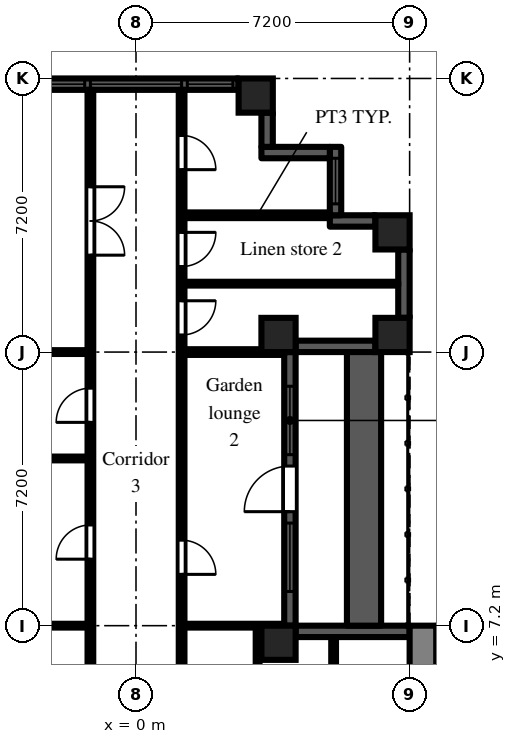
"""IFC4 building model, lengths in metres.
Left out: names, types, materials, properties, quantities, classifications, styles, units other than length and angle.
Written with IfcOpenShell. Run it as: python <this file> out.ifc"""

import sys

from ifc_helpers import new_model, si_unit, direction, frame, frame_2d, origin, origin_2d, place, context, subcontext, project, spatial, rectangle, extrude, element, fill, save


model = new_model("IFC4")
c1 = context("Model", 3, precision=1e-05, world=origin(), true_north=direction((0.0, 1.0)))
c2 = subcontext(c1, "Body", "Model", "MODEL_VIEW")
j1 = project(units=[si_unit("LENGTHUNIT", "METRE"), si_unit("PLANEANGLEUNIT", "RADIAN")], contexts=[c1])
p1 = place(None, origin())
s1 = spatial("IfcSite", under=j1, at=p1, CompositionType="ELEMENT")
p2 = place(p1, origin())
s2 = spatial("IfcBuilding", under=s1, at=p2, CompositionType="ELEMENT")
p3 = place(p2, frame((0.0, 0.0, 93.9)))
s3 = spatial("IfcBuildingStorey", under=s2, at=p3, CompositionType="ELEMENT", Elevation=93.9)
for number, where, z_axis, x_axis in (
    (1, (3.15, 21.15, 0.0), (0.0, 0.0, 1.0), (1.0, 0.0, 0.0)),
    (2, (3.75, 6.75, 0.0), (0.0, 0.0, 1.0), (1.0, 0.0, 0.0)),
    (3, (3.75, 14.85, 0.0), (0.0, 0.0, 1.0), (1.0, 0.0, 0.0)),
    (4, (6.75, 14.85, 0.0), (0.0, 0.0, 1.0), (1.0, 0.0, 0.0)),
    (5, (6.75, 17.55, 0.0), (0.0, 0.0, 1.0), (1.0, 0.0, 0.0)),
):
    element("IfcColumn", number, at=place(p3, frame(where, z_axis=z_axis, x_axis=x_axis)), inside=s3, PredefinedType="COLUMN", context=c2, shape_type="SweptSolid", body=[
        extrude(rectangle(XDim=0.9, YDim=0.9, at=origin_2d()), origin(), (0.0, 0.0, 1.0), 3.0),
    ])
p4 = place(p3, frame((7.2, 7.05, 0.0), z_axis=(0.0, 0.0, 1.0), x_axis=(-1.0, 0.0, 0.0)))
e6 = element("IfcWall", 6, at=p4, inside=s3, PredefinedType="SOLIDWALL", context=c2, shape_type="SweptSolid", body=[
    extrude(rectangle(XDim=3.0, YDim=0.3, at=frame_2d((1.5, 0.0))), origin(), (0.0, 0.0, 1.0), 2.1),
])
p5 = place(p3, frame((4.05, 7.2, 0.0), z_axis=(0.0, 0.0, 1.0), x_axis=(0.0, 1.0, 0.0)))
e7 = element("IfcWall", 7, at=p5, inside=s3, PredefinedType="SOLIDWALL", context=c2, shape_type="SweptSolid", body=[
    extrude(rectangle(XDim=7.2, YDim=0.3, at=frame_2d((3.6, 0.0))), origin(), (0.0, 0.0, 1.0), 2.1),
])
p6 = place(p5, frame((3.0, 0.0, 0.0)))
e8 = element("IfcOpeningElement", 8, at=p6, cuts=e7, PredefinedType="OPENING", context=c2, shape_type="SweptSolid", body=[
    extrude(rectangle(XDim=1.2, YDim=2.05, at=frame_2d((0.6, 1.025))), frame((0.0, 0.16, 0.0), z_axis=(0.0, -1.0, 0.0), x_axis=(1.0, 0.0, 0.0)), (0.0, 0.0, 1.0), 0.32),
])
p7 = place(p5, frame((0.9, 0.0, 0.2)))
e9 = element("IfcOpeningElement", 9, at=p7, cuts=e7, PredefinedType="OPENING", context=c2, shape_type="SweptSolid", body=[
    extrude(rectangle(XDim=1.8, YDim=1.85, at=frame_2d((0.9, 0.925))), frame((0.0, 0.16, 0.0), z_axis=(0.0, -1.0, 0.0), x_axis=(1.0, 0.0, 0.0)), (0.0, 0.0, 1.0), 0.32),
])
p8 = place(p5, frame((4.5, 0.0, 0.2)))
e10 = element("IfcOpeningElement", 10, at=p8, cuts=e7, PredefinedType="OPENING", context=c2, shape_type="SweptSolid", body=[
    extrude(rectangle(XDim=1.8, YDim=1.85, at=frame_2d((0.9, 0.925))), frame((0.0, 0.16, 0.0), z_axis=(0.0, -1.0, 0.0), x_axis=(1.0, 0.0, 0.0)), (0.0, 0.0, 1.0), 0.32),
])
p9 = place(p3, frame((4.2, 14.55, 0.0), z_axis=(0.0, 0.0, 1.0), x_axis=(1.0, 0.0, 0.0)))
e11 = element("IfcWall", 11, at=p9, inside=s3, PredefinedType="SOLIDWALL", context=c2, shape_type="SweptSolid", body=[
    extrude(rectangle(XDim=2.1, YDim=0.3, at=frame_2d((1.05, 0.0))), origin(), (0.0, 0.0, 1.0), 2.1),
])
p10 = place(p3, frame((7.05, 15.3, 0.0), z_axis=(0.0, 0.0, 1.0), x_axis=(0.0, 1.0, 0.0)))
e12 = element("IfcWall", 12, at=p10, inside=s3, PredefinedType="SOLIDWALL", context=c2, shape_type="SweptSolid", body=[
    extrude(rectangle(XDim=1.8, YDim=0.3, at=frame_2d((0.9, 0.0))), origin(), (0.0, 0.0, 1.0), 2.1),
])
p11 = place(p3, frame((6.3, 17.85, 0.0), z_axis=(0.0, 0.0, 1.0), x_axis=(-1.0, 0.0, 0.0)))
e13 = element("IfcWall", 13, at=p11, inside=s3, PredefinedType="SOLIDWALL", context=c2, shape_type="SweptSolid", body=[
    extrude(rectangle(XDim=1.2, YDim=0.3, at=frame_2d((0.6, 0.0))), origin(), (0.0, 0.0, 1.0), 2.575),
])
p12 = place(p3, frame((5.25, 18.0, 0.0), z_axis=(0.0, 0.0, 1.0), x_axis=(0.0, 1.0, 0.0)))
e14 = element("IfcWall", 14, at=p12, inside=s3, PredefinedType="SOLIDWALL", context=c2, shape_type="SweptSolid", body=[
    extrude(rectangle(XDim=1.8, YDim=0.3, at=frame_2d((0.9, 0.0))), origin(), (0.0, 0.0, 1.0), 2.575),
])
p13 = place(p12, frame((0.3, 0.0, 0.2)))
e15 = element("IfcOpeningElement", 15, at=p13, cuts=e14, PredefinedType="OPENING", context=c2, shape_type="SweptSolid", body=[
    extrude(rectangle(XDim=1.2, YDim=1.85, at=frame_2d((0.6, 0.925))), frame((0.0, 0.16, 0.0), z_axis=(0.0, -1.0, 0.0), x_axis=(1.0, 0.0, 0.0)), (0.0, 0.0, 1.0), 0.32),
])
p14 = place(p3, frame((5.1, 19.65, 0.0), z_axis=(0.0, 0.0, 1.0), x_axis=(-1.0, 0.0, 0.0)))
e16 = element("IfcWall", 16, at=p14, inside=s3, PredefinedType="SOLIDWALL", context=c2, shape_type="SweptSolid", body=[
    extrude(rectangle(XDim=1.8, YDim=0.3, at=frame_2d((0.9, 0.0))), origin(), (0.0, 0.0, 1.0), 2.575),
])
p15 = place(p3, frame((3.45, 19.8, 0.0), z_axis=(0.0, 0.0, 1.0), x_axis=(0.0, 1.0, 0.0)))
e17 = element("IfcWall", 17, at=p15, inside=s3, PredefinedType="SOLIDWALL", context=c2, shape_type="SweptSolid", body=[
    extrude(rectangle(XDim=0.9, YDim=0.3, at=frame_2d((0.45, 0.0))), origin(), (0.0, 0.0, 1.0), 2.575),
])
p16 = place(p3, frame((2.7, 21.45, 0.0), z_axis=(0.0, 0.0, 1.0), x_axis=(-1.0, 0.0, 0.0)))
e18 = element("IfcWall", 18, at=p16, inside=s3, PredefinedType="SOLIDWALL", context=c2, shape_type="SweptSolid", body=[
    extrude(rectangle(XDim=5.4, YDim=0.3, at=frame_2d((2.7, 0.0))), origin(), (0.0, 0.0, 1.0), 2.1),
])
p17 = place(p16, frame((1.5, 0.0, 0.2)))
e19 = element("IfcOpeningElement", 19, at=p17, cuts=e18, PredefinedType="OPENING", context=c2, shape_type="SweptSolid", body=[
    extrude(rectangle(XDim=2.4, YDim=1.85, at=frame_2d((1.2, 0.925))), frame((0.0, 0.16, 0.0), z_axis=(0.0, -1.0, 0.0), x_axis=(1.0, 0.0, 0.0)), (0.0, 0.0, 1.0), 0.32),
])
p18 = place(p16, frame((0.15, 0.0, 0.2)))
e20 = element("IfcOpeningElement", 20, at=p18, cuts=e18, PredefinedType="OPENING", context=c2, shape_type="SweptSolid", body=[
    extrude(rectangle(XDim=1.2, YDim=1.85, at=frame_2d((0.6, 0.925))), frame((0.0, 0.16, 0.0), z_axis=(0.0, -1.0, 0.0), x_axis=(1.0, 0.0, 0.0)), (0.0, 0.0, 1.0), 0.32),
])
p19 = place(p16, frame((4.05, 0.0, 0.2)))
e21 = element("IfcOpeningElement", 21, at=p19, cuts=e18, PredefinedType="OPENING", context=c2, shape_type="SweptSolid", body=[
    extrude(rectangle(XDim=1.2, YDim=1.85, at=frame_2d((0.6, 0.925))), frame((0.0, 0.16, 0.0), z_axis=(0.0, -1.0, 0.0), x_axis=(1.0, 0.0, 0.0)), (0.0, 0.0, 1.0), 0.32),
])
p20 = place(p3, frame((6.0, 7.2, 0.0), z_axis=(0.0, 0.0, 1.0), x_axis=(0.0, 1.0, 0.0)))
e22 = element("IfcWall", 22, at=p20, inside=s3, PredefinedType="PARAPET", context=c2, shape_type="SweptSolid", body=[
    extrude(rectangle(XDim=7.2, YDim=0.9, at=frame_2d((3.6, 0.0))), origin(), (0.0, 0.0, 1.0), 0.8),
])
p21 = place(p3, frame((7.55, -7.2, 0.0), z_axis=(0.0, 0.0, 1.0), x_axis=(0.0, 1.0, 0.0)))
e23 = element("IfcWall", 23, at=p21, inside=s3, PredefinedType="SHEAR", context=c2, shape_type="SweptSolid", body=[
    extrude(rectangle(XDim=14.4, YDim=0.7, at=frame_2d((7.2, 0.0))), origin(), (0.0, 0.0, 1.0), 2.575),
])
p22 = place(p21, frame((6.0, 0.0, 0.0)))
e24 = element("IfcOpeningElement", 24, at=p22, cuts=e23, PredefinedType="OPENING", context=c2, shape_type="SweptSolid", body=[
    extrude(rectangle(XDim=2.4, YDim=2.2, at=frame_2d((1.2, 1.1))), frame((0.0, 0.36, 0.0), z_axis=(0.0, -1.0, 0.0), x_axis=(1.0, 0.0, 0.0)), (0.0, 0.0, 1.0), 0.72),
])
for number, where, z_axis, x_axis in (
    (25, (-3.9, 7.2, 0.0), (0.0, 0.0, 1.0), (1.0, 0.0, 0.0)),
    (26, (-3.9, 11.6, 0.0), (0.0, 0.0, 1.0), (1.0, 0.0, 0.0)),
    (27, (-3.9, 14.4, 0.0), (0.0, 0.0, 1.0), (1.0, 0.0, 0.0)),
):
    element("IfcWall", number, at=place(p3, frame(where, z_axis=z_axis, x_axis=x_axis)), inside=s3, PredefinedType="PARTITIONING", context=c2, shape_type="SweptSolid", body=[
        extrude(rectangle(XDim=2.625, YDim=0.1, at=frame_2d((1.312, 0.0))), origin(), (0.0, 0.0, 1.0), 2.575),
    ])
p23 = place(p3, frame((-1.2, 1.275, 0.0), z_axis=(0.0, 0.0, 1.0), x_axis=(0.0, 1.0, 0.0)))
e28 = element("IfcWall", 28, at=p23, inside=s3, PredefinedType="PARTITIONING", context=c2, shape_type="SweptSolid", body=[
    extrude(rectangle(XDim=20.025, YDim=0.15, at=frame_2d((10.013, 0.0))), origin(), (0.0, 0.0, 1.0), 2.575),
])
p24 = place(p23, frame((2.475, 0.0, 0.0)))
e29 = element("IfcOpeningElement", 29, at=p24, cuts=e28, PredefinedType="OPENING", context=c2, shape_type="SweptSolid", body=[
    extrude(rectangle(XDim=0.9, YDim=2.1, at=frame_2d((0.45, 1.05))), frame((0.0, 0.085, 0.0), z_axis=(0.0, -1.0, 0.0), x_axis=(1.0, 0.0, 0.0)), (0.0, 0.0, 1.0), 0.17),
])
p25 = place(p23, frame((11.275, 0.0, 0.0)))
e30 = element("IfcOpeningElement", 30, at=p25, cuts=e28, PredefinedType="OPENING", context=c2, shape_type="SweptSolid", body=[
    extrude(rectangle(XDim=0.9, YDim=2.1, at=frame_2d((0.45, 1.05))), frame((0.0, 0.085, 0.0), z_axis=(0.0, -1.0, 0.0), x_axis=(1.0, 0.0, 0.0)), (0.0, 0.0, 1.0), 0.17),
])
p26 = place(p23, frame((7.675, 0.0, 0.0)))
e31 = element("IfcOpeningElement", 31, at=p26, cuts=e28, PredefinedType="OPENING", context=c2, shape_type="SweptSolid", body=[
    extrude(rectangle(XDim=0.9, YDim=2.1, at=frame_2d((0.45, 1.05))), frame((0.0, 0.085, 0.0), z_axis=(0.0, -1.0, 0.0), x_axis=(1.0, 0.0, 0.0)), (0.0, 0.0, 1.0), 0.17),
])
p27 = place(p23, frame((15.675, 0.0, 0.0)))
e32 = element("IfcOpeningElement", 32, at=p27, cuts=e28, PredefinedType="OPENING", context=c2, shape_type="SweptSolid", body=[
    extrude(rectangle(XDim=1.8, YDim=2.1, at=frame_2d((0.9, 1.05))), frame((0.0, 0.085, 0.0), z_axis=(0.0, -1.0, 0.0), x_axis=(1.0, 0.0, 0.0)), (0.0, 0.0, 1.0), 0.17),
])
p28 = place(p3, frame((1.2, 1.125, 0.0), z_axis=(0.0, 0.0, 1.0), x_axis=(0.0, 1.0, 0.0)))
e33 = element("IfcWall", 33, at=p28, inside=s3, PredefinedType="PARTITIONING", context=c2, shape_type="SweptSolid", body=[
    extrude(rectangle(XDim=20.175, YDim=0.15, at=frame_2d((10.087, 0.0))), origin(), (0.0, 0.0, 1.0), 2.575),
])
p29 = place(p28, frame((2.625, 0.0, 0.0)))
e34 = element("IfcOpeningElement", 34, at=p29, cuts=e33, PredefinedType="OPENING", context=c2, shape_type="SweptSolid", body=[
    extrude(rectangle(XDim=0.9, YDim=2.1, at=frame_2d((0.45, 1.05))), frame((0.0, 0.085, 0.0), z_axis=(0.0, -1.0, 0.0), x_axis=(1.0, 0.0, 0.0)), (0.0, 0.0, 1.0), 0.17),
])
p30 = place(p28, frame((7.425, 0.0, 0.0)))
e35 = element("IfcOpeningElement", 35, at=p30, cuts=e33, PredefinedType="OPENING", context=c2, shape_type="SweptSolid", body=[
    extrude(rectangle(XDim=0.9, YDim=2.1, at=frame_2d((0.45, 1.05))), frame((0.0, 0.085, 0.0), z_axis=(0.0, -1.0, 0.0), x_axis=(1.0, 0.0, 0.0)), (0.0, 0.0, 1.0), 0.17),
])
p31 = place(p28, frame((13.725, 0.0, 0.0)))
e36 = element("IfcOpeningElement", 36, at=p31, cuts=e33, PredefinedType="OPENING", context=c2, shape_type="SweptSolid", body=[
    extrude(rectangle(XDim=0.9, YDim=2.1, at=frame_2d((0.45, 1.05))), frame((0.0, 0.085, 0.0), z_axis=(0.0, -1.0, 0.0), x_axis=(1.0, 0.0, 0.0)), (0.0, 0.0, 1.0), 0.17),
])
p32 = place(p28, frame((15.525, 0.0, 0.0)))
e37 = element("IfcOpeningElement", 37, at=p32, cuts=e33, PredefinedType="OPENING", context=c2, shape_type="SweptSolid", body=[
    extrude(rectangle(XDim=0.9, YDim=2.1, at=frame_2d((0.45, 1.05))), frame((0.0, 0.085, 0.0), z_axis=(0.0, -1.0, 0.0), x_axis=(1.0, 0.0, 0.0)), (0.0, 0.0, 1.0), 0.17),
])
p33 = place(p28, frame((18.075, 0.0, 0.0)))
e38 = element("IfcOpeningElement", 38, at=p33, cuts=e33, PredefinedType="OPENING", context=c2, shape_type="SweptSolid", body=[
    extrude(rectangle(XDim=0.9, YDim=2.1, at=frame_2d((0.45, 1.05))), frame((0.0, 0.085, 0.0), z_axis=(0.0, -1.0, 0.0), x_axis=(1.0, 0.0, 0.0)), (0.0, 0.0, 1.0), 0.17),
])
p34 = place(p3, frame((1.275, 7.2, 0.0), z_axis=(0.0, 0.0, 1.0), x_axis=(1.0, 0.0, 0.0)))
e39 = element("IfcWall", 39, at=p34, inside=s3, PredefinedType="PARTITIONING", context=c2, shape_type="SweptSolid", body=[
    extrude(rectangle(XDim=2.625, YDim=0.1, at=frame_2d((1.312, 0.0))), origin(), (0.0, 0.0, 1.0), 2.575),
])
p35 = place(p3, frame((1.275, 14.4, 0.0), z_axis=(0.0, 0.0, 1.0), x_axis=(1.0, 0.0, 0.0)))
e40 = element("IfcWall", 40, at=p35, inside=s3, PredefinedType="PARTITIONING", context=c2, shape_type="SweptSolid", body=[
    extrude(rectangle(XDim=2.625, YDim=0.15, at=frame_2d((1.312, 0.0))), origin(), (0.0, 0.0, 1.0), 2.575),
])
p36 = place(p3, frame((1.275, 16.2, 0.0), z_axis=(0.0, 0.0, 1.0), x_axis=(1.0, 0.0, 0.0)))
e41 = element("IfcWall", 41, at=p36, inside=s3, PredefinedType="PARTITIONING", context=c2, shape_type="SweptSolid", body=[
    extrude(rectangle(XDim=5.625, YDim=0.1, at=frame_2d((2.812, 0.0))), origin(), (0.0, 0.0, 1.0), 2.575),
])
p37 = place(p3, frame((1.275, 18.0, 0.0), z_axis=(0.0, 0.0, 1.0), x_axis=(1.0, 0.0, 0.0)))
e42 = element("IfcWall", 42, at=p37, inside=s3, PredefinedType="PARTITIONING", context=c2, shape_type="SweptSolid", body=[
    extrude(rectangle(XDim=3.825, YDim=0.15, at=frame_2d((1.913, 0.0))), origin(), (0.0, 0.0, 1.0), 2.575),
])
p38 = place(p3, frame((3.2, 1.275, 0.0), z_axis=(0.0, 0.0, 1.0), x_axis=(0.0, 1.0, 0.0)))
e43 = element("IfcWall", 43, at=p38, inside=s3, PredefinedType="PARTITIONING", context=c2, shape_type="SweptSolid", body=[
    extrude(rectangle(XDim=5.875, YDim=0.1, at=frame_2d((2.938, 0.0))), origin(), (0.0, 0.0, 1.0), 2.575),
])
p39 = place(p3, frame((5.2, 1.275, 0.0), z_axis=(0.0, 0.0, 1.0), x_axis=(0.0, 1.0, 0.0)))
e44 = element("IfcWall", 44, at=p39, inside=s3, PredefinedType="PARTITIONING", context=c2, shape_type="SweptSolid", body=[
    extrude(rectangle(XDim=5.625, YDim=0.125, at=frame_2d((2.812, 0.0))), origin(), (0.0, 0.0, 1.0), 2.575),
])
p40 = place(p6, origin())
e45 = element("IfcDoor", 45, at=p40, inside=s3, OperationType="SINGLE_SWING_LEFT", PredefinedType="DOOR", context=c2, shape_type="SweptSolid", body=[
    extrude(rectangle(XDim=1.2, YDim=2.05, at=frame_2d((0.6, 1.025))), frame((0.0, 0.025, 0.0), z_axis=(0.0, -1.0, 0.0), x_axis=(1.0, 0.0, 0.0)), (0.0, 0.0, 1.0), 0.05),
])
fill(e8, e45)
p41 = place(p7, origin())
e46 = element("IfcWindow", 46, at=p41, inside=s3, PartitioningType="SINGLE_PANEL", PredefinedType="WINDOW", context=c2, shape_type="SweptSolid", body=[
    extrude(rectangle(XDim=1.8, YDim=1.85, at=frame_2d((0.9, 0.925))), frame((0.0, 0.03, 0.0), z_axis=(0.0, -1.0, 0.0), x_axis=(1.0, 0.0, 0.0)), (0.0, 0.0, 1.0), 0.06),
])
fill(e9, e46)
p42 = place(p8, origin())
e47 = element("IfcWindow", 47, at=p42, inside=s3, PartitioningType="SINGLE_PANEL", PredefinedType="WINDOW", context=c2, shape_type="SweptSolid", body=[
    extrude(rectangle(XDim=1.8, YDim=1.85, at=frame_2d((0.9, 0.925))), frame((0.0, 0.03, 0.0), z_axis=(0.0, -1.0, 0.0), x_axis=(1.0, 0.0, 0.0)), (0.0, 0.0, 1.0), 0.06),
])
fill(e10, e47)
p43 = place(p13, origin())
e48 = element("IfcWindow", 48, at=p43, inside=s3, PartitioningType="SINGLE_PANEL", PredefinedType="WINDOW", context=c2, shape_type="SweptSolid", body=[
    extrude(rectangle(XDim=1.2, YDim=1.85, at=frame_2d((0.6, 0.925))), frame((0.0, 0.03, 0.0), z_axis=(0.0, -1.0, 0.0), x_axis=(1.0, 0.0, 0.0)), (0.0, 0.0, 1.0), 0.06),
])
fill(e15, e48)
p44 = place(p17, origin())
e49 = element("IfcWindow", 49, at=p44, inside=s3, PartitioningType="SINGLE_PANEL", PredefinedType="WINDOW", context=c2, shape_type="SweptSolid", body=[
    extrude(rectangle(XDim=2.4, YDim=1.85, at=frame_2d((1.2, 0.925))), frame((0.0, 0.03, 0.0), z_axis=(0.0, -1.0, 0.0), x_axis=(1.0, 0.0, 0.0)), (0.0, 0.0, 1.0), 0.06),
])
fill(e19, e49)
p45 = place(p18, origin())
e50 = element("IfcWindow", 50, at=p45, inside=s3, PartitioningType="SINGLE_PANEL", PredefinedType="WINDOW", context=c2, shape_type="SweptSolid", body=[
    extrude(rectangle(XDim=1.2, YDim=1.85, at=frame_2d((0.6, 0.925))), frame((0.0, 0.03, 0.0), z_axis=(0.0, -1.0, 0.0), x_axis=(1.0, 0.0, 0.0)), (0.0, 0.0, 1.0), 0.06),
])
fill(e20, e50)
p46 = place(p19, origin())
e51 = element("IfcWindow", 51, at=p46, inside=s3, PartitioningType="SINGLE_PANEL", PredefinedType="WINDOW", context=c2, shape_type="SweptSolid", body=[
    extrude(rectangle(XDim=1.2, YDim=1.85, at=frame_2d((0.6, 0.925))), frame((0.0, 0.03, 0.0), z_axis=(0.0, -1.0, 0.0), x_axis=(1.0, 0.0, 0.0)), (0.0, 0.0, 1.0), 0.06),
])
fill(e21, e51)
p47 = place(p25, origin())
e52 = element("IfcDoor", 52, at=p47, inside=s3, OperationType="SINGLE_SWING_LEFT", PredefinedType="DOOR", context=c2, shape_type="SweptSolid", body=[
    extrude(rectangle(XDim=0.9, YDim=2.1, at=frame_2d((0.45, 1.05))), frame((0.0, 0.025, 0.0), z_axis=(0.0, -1.0, 0.0), x_axis=(1.0, 0.0, 0.0)), (0.0, 0.0, 1.0), 0.05),
])
fill(e30, e52)
p48 = place(p26, origin())
e53 = element("IfcDoor", 53, at=p48, inside=s3, OperationType="SINGLE_SWING_LEFT", PredefinedType="DOOR", context=c2, shape_type="SweptSolid", body=[
    extrude(rectangle(XDim=0.9, YDim=2.1, at=frame_2d((0.45, 1.05))), frame((0.0, 0.025, 0.0), z_axis=(0.0, -1.0, 0.0), x_axis=(1.0, 0.0, 0.0)), (0.0, 0.0, 1.0), 0.05),
])
fill(e31, e53)
p49 = place(p27, frame((1.8, 0.0, 0.0), z_axis=(0.0, 0.0, 1.0), x_axis=(-1.0, 0.0, 0.0)))
e54 = element("IfcDoor", 54, at=p49, inside=s3, OperationType="DOUBLE_DOOR_DOUBLE_SWING", PredefinedType="DOOR", context=c2, shape_type="SweptSolid", body=[
    extrude(rectangle(XDim=1.8, YDim=2.1, at=frame_2d((0.9, 1.05))), frame((0.0, 0.025, 0.0), z_axis=(0.0, -1.0, 0.0), x_axis=(1.0, 0.0, 0.0)), (0.0, 0.0, 1.0), 0.05),
])
fill(e32, e54)
p50 = place(p30, frame((0.9, 0.0, 0.0), z_axis=(0.0, 0.0, 1.0), x_axis=(-1.0, 0.0, 0.0)))
e55 = element("IfcDoor", 55, at=p50, inside=s3, OperationType="SINGLE_SWING_RIGHT", PredefinedType="DOOR", context=c2, shape_type="SweptSolid", body=[
    extrude(rectangle(XDim=0.9, YDim=2.1, at=frame_2d((0.45, 1.05))), frame((0.0, 0.025, 0.0), z_axis=(0.0, -1.0, 0.0), x_axis=(1.0, 0.0, 0.0)), (0.0, 0.0, 1.0), 0.05),
])
fill(e35, e55)
p51 = place(p31, frame((0.9, 0.0, 0.0), z_axis=(0.0, 0.0, 1.0), x_axis=(-1.0, 0.0, 0.0)))
e56 = element("IfcDoor", 56, at=p51, inside=s3, OperationType="SINGLE_SWING_LEFT", PredefinedType="DOOR", context=c2, shape_type="SweptSolid", body=[
    extrude(rectangle(XDim=0.9, YDim=2.1, at=frame_2d((0.45, 1.05))), frame((0.0, 0.025, 0.0), z_axis=(0.0, -1.0, 0.0), x_axis=(1.0, 0.0, 0.0)), (0.0, 0.0, 1.0), 0.05),
])
fill(e36, e56)
p52 = place(p32, frame((0.9, 0.0, 0.0), z_axis=(0.0, 0.0, 1.0), x_axis=(-1.0, 0.0, 0.0)))
e57 = element("IfcDoor", 57, at=p52, inside=s3, OperationType="SINGLE_SWING_LEFT", PredefinedType="DOOR", context=c2, shape_type="SweptSolid", body=[
    extrude(rectangle(XDim=0.9, YDim=2.1, at=frame_2d((0.45, 1.05))), frame((0.0, 0.025, 0.0), z_axis=(0.0, -1.0, 0.0), x_axis=(1.0, 0.0, 0.0)), (0.0, 0.0, 1.0), 0.05),
])
fill(e37, e57)
p53 = place(p33, frame((0.9, 0.0, 0.0), z_axis=(0.0, 0.0, 1.0), x_axis=(-1.0, 0.0, 0.0)))
e58 = element("IfcDoor", 58, at=p53, inside=s3, OperationType="SINGLE_SWING_RIGHT", PredefinedType="DOOR", context=c2, shape_type="SweptSolid", body=[
    extrude(rectangle(XDim=0.9, YDim=2.1, at=frame_2d((0.45, 1.05))), frame((0.0, 0.025, 0.0), z_axis=(0.0, -1.0, 0.0), x_axis=(1.0, 0.0, 0.0)), (0.0, 0.0, 1.0), 0.05),
])
fill(e38, e58)
save(model, sys.argv[1])
